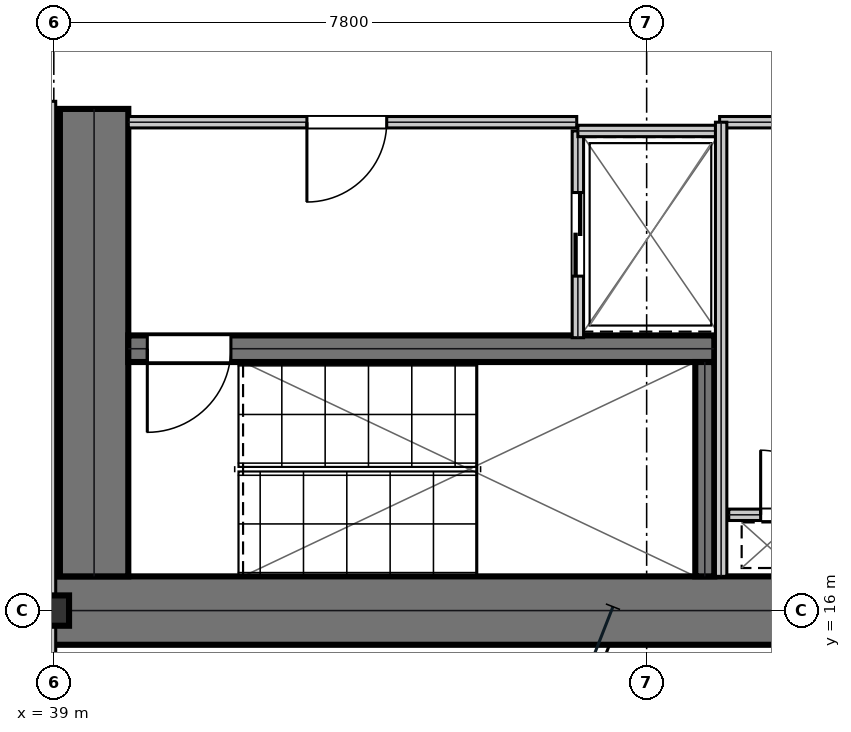
"""IFC4 building model, lengths in metres.
Left out: names, types, materials, properties, quantities, classifications, styles, units other than length and angle.
Written with IfcOpenShell. Run it as: python <this file> out.ifc"""

import sys

from ifc_helpers import new_model, si_unit, direction, frame, frame_2d, origin, origin_2d, place, context, subcontext, project, spatial, rectangle, i_section, extrude, element, fill, save


model = new_model("IFC4")
c1 = context("Model", 3, precision=1e-05, world=origin(), true_north=direction((0.0, 1.0)))
c2 = subcontext(c1, "Body", "Model", "MODEL_VIEW")
j1 = project(units=[si_unit("LENGTHUNIT", "METRE"), si_unit("PLANEANGLEUNIT", "RADIAN")], contexts=[c1])
p1 = place(None, origin())
s1 = spatial("IfcSite", under=j1, at=p1, CompositionType="ELEMENT")
p2 = place(p1, origin())
s2 = spatial("IfcBuilding", under=s1, at=p2, CompositionType="ELEMENT")
p3 = place(p2, frame((0.0, 0.0, 58.05)))
s3 = spatial("IfcBuildingStorey", under=s2, at=p3, CompositionType="ELEMENT", Elevation=58.05)
p4 = place(p3, frame((38.8, 16.0, 0.0), z_axis=(0.0, 0.0, 1.0), x_axis=(1.0, 0.0, 0.0)))
e1 = element("IfcWall", 1, at=p4, inside=s3, PredefinedType="SHEAR", context=c2, shape_type="SweptSolid", body=[
    extrude(rectangle(XDim=16.0, YDim=0.9, at=frame_2d((8.0, 0.0))), origin(), (0.0, 0.0, 1.0), 3.81),
])
p5 = place(p3, frame((39.53, 16.45, 0.0), z_axis=(0.0, 0.0, 1.0), x_axis=(0.0, 1.0, 0.0)))
e2 = element("IfcWall", 2, at=p5, inside=s3, PredefinedType="SHEAR", context=c2, shape_type="SweptSolid", body=[
    extrude(rectangle(XDim=6.15, YDim=0.9, at=frame_2d((3.075, 0.0))), origin(), (0.0, 0.0, 1.0), 3.81),
])
p6 = place(p3, frame((39.98, 19.445, 0.0), z_axis=(0.0, 0.0, 1.0), x_axis=(1.0, 0.0, 0.0)))
e3 = element("IfcWall", 3, at=p6, inside=s3, PredefinedType="SHEAR", context=c2, shape_type="SweptSolid", body=[
    extrude(rectangle(XDim=7.71, YDim=0.35, at=frame_2d((3.855, 0.0))), origin(), (0.0, 0.0, 1.0), 3.81),
])
p7 = place(p6, frame((0.25, 0.0, 0.0)))
e4 = element("IfcOpeningElement", 4, at=p7, cuts=e3, PredefinedType="OPENING", context=c2, shape_type="SweptSolid", body=[
    extrude(rectangle(XDim=1.1, YDim=2.15, at=frame_2d((0.55, 1.075))), frame((0.0, 0.185, 0.0), z_axis=(0.0, -1.0, 0.0), x_axis=(1.0, 0.0, 0.0)), (0.0, 0.0, 1.0), 0.37),
])
p8 = place(p3, frame((47.565, 16.45, 0.0), z_axis=(0.0, 0.0, 1.0), x_axis=(0.0, 1.0, 0.0)))
e5 = element("IfcWall", 5, at=p8, inside=s3, PredefinedType="SHEAR", context=c2, shape_type="SweptSolid", body=[
    extrude(rectangle(XDim=2.82, YDim=0.25, at=frame_2d((1.41, 0.0))), origin(), (0.0, 0.0, 1.0), 3.81),
])
p9 = place(p3, frame((39.0, 16.0, 0.0), z_axis=(0.0, 0.0, 1.0), x_axis=(1.0, 0.0, 0.0)))
e6 = element("IfcColumn", 6, at=p9, inside=s3, PredefinedType="COLUMN", context=c2, shape_type="SweptSolid", body=[
    extrude(i_section(OverallWidth=0.401, OverallDepth=0.399, WebThickness=0.025, FlangeThickness=0.04, at=origin_2d()), origin(), (0.0, 0.0, 1.0), 4.044),
])
p10 = place(p3, frame((39.98, 22.425, 0.0), z_axis=(0.0, 0.0, 1.0), x_axis=(1.0, 0.0, 0.0)))
e7 = element("IfcWall", 7, at=p10, inside=s3, PredefinedType="PARTITIONING", context=c2, shape_type="SweptSolid", body=[
    extrude(rectangle(XDim=5.9, YDim=0.15, at=frame_2d((2.95, 0.0))), origin(), (0.0, 0.0, 1.0), 3.81),
])
p11 = place(p10, frame((2.35, 0.0, 0.0)))
e8 = element("IfcOpeningElement", 8, at=p11, cuts=e7, PredefinedType="OPENING", context=c2, shape_type="SweptSolid", body=[
    extrude(rectangle(XDim=1.05, YDim=2.15, at=frame_2d((0.525, 1.075))), frame((0.0, 0.085, 0.0), z_axis=(0.0, -1.0, 0.0), x_axis=(1.0, 0.0, 0.0)), (0.0, 0.0, 1.0), 0.17),
])
p12 = place(p3, frame((45.895, 19.59, 0.0), z_axis=(0.0, 0.0, 1.0), x_axis=(0.0, 1.0, 0.0)))
e9 = element("IfcWall", 9, at=p12, inside=s3, PredefinedType="PARTITIONING", context=c2, shape_type="SweptSolid", body=[
    extrude(rectangle(XDim=2.72, YDim=0.15, at=frame_2d((1.36, 0.0))), origin(), (0.0, 0.0, 1.0), 3.81),
])
p13 = place(p12, frame((0.81, 0.0, 0.0)))
e10 = element("IfcOpeningElement", 10, at=p13, cuts=e9, PredefinedType="OPENING", context=c2, shape_type="SweptSolid", body=[
    extrude(rectangle(XDim=1.1, YDim=2.15, at=frame_2d((0.55, 1.075))), frame((0.0, 0.085, 0.0), z_axis=(0.0, -1.0, 0.0), x_axis=(1.0, 0.0, 0.0)), (0.0, 0.0, 1.0), 0.17),
])
p14 = place(p3, frame((45.895, 22.31, 0.0), z_axis=(0.0, 0.0, 1.0), x_axis=(1.0, 0.0, 0.0)))
e11 = element("IfcWall", 11, at=p14, inside=s3, PredefinedType="PARTITIONING", context=c2, shape_type="SweptSolid", body=[
    extrude(rectangle(XDim=1.915, YDim=0.15, at=frame_2d((0.958, 0.0))), origin(), (0.0, 0.0, 1.0), 3.81),
])
p15 = place(p3, frame((47.88, 17.26, 0.0), z_axis=(0.0, 0.0, 1.0), x_axis=(1.0, 0.0, 0.0)))
e12 = element("IfcWall", 12, at=p15, inside=s3, PredefinedType="PARTITIONING", context=c2, shape_type="SweptSolid", body=[
    extrude(rectangle(XDim=1.72, YDim=0.15, at=frame_2d((0.86, 0.0))), origin(), (0.0, 0.0, 1.0), 3.81),
])
p16 = place(p15, frame((0.42, 0.0, 0.0)))
e13 = element("IfcOpeningElement", 13, at=p16, cuts=e12, PredefinedType="OPENING", context=c2, shape_type="SweptSolid", body=[
    extrude(rectangle(XDim=0.85, YDim=2.15, at=frame_2d((0.425, 1.075))), frame((0.0, 0.085, 0.0), z_axis=(0.0, -1.0, 0.0), x_axis=(1.0, 0.0, 0.0)), (0.0, 0.0, 1.0), 0.17),
])
p17 = place(p3, frame((47.76, 22.425, 0.0), z_axis=(0.0, 0.0, 1.0), x_axis=(1.0, 0.0, 0.0)))
e14 = element("IfcWall", 14, at=p17, inside=s3, PredefinedType="PARTITIONING", context=c2, shape_type="SweptSolid", body=[
    extrude(rectangle(XDim=1.96, YDim=0.15, at=frame_2d((0.98, 0.0))), origin(), (0.0, 0.0, 1.0), 3.81),
])
p18 = place(p3, frame((47.78, 16.45, 0.0), z_axis=(0.0, 0.0, 1.0), x_axis=(0.0, 1.0, 0.0)))
e15 = element("IfcWall", 15, at=p18, inside=s3, PredefinedType="PARTITIONING", context=c2, shape_type="SweptSolid", body=[
    extrude(rectangle(XDim=5.975, YDim=0.15, at=frame_2d((2.988, 0.0))), origin(), (0.0, 0.0, 1.0), 3.81),
])
p19 = place(p3, frame((38.95, 14.5, 0.0), z_axis=(0.0, 0.0, 1.0), x_axis=(0.0, 1.0, 0.0)))
e16 = element("IfcWall", 16, at=p19, inside=s3, PredefinedType="PARTITIONING", context=c2, shape_type="SweptSolid", body=[
    extrude(rectangle(XDim=8.2, YDim=0.15, at=frame_2d((4.1, 0.0))), origin(), (0.0, 0.0, 1.0), 3.181),
])
p20 = place(p11, frame((1.05, 0.0, 0.0), z_axis=(0.0, 0.0, 1.0), x_axis=(-1.0, 0.0, 0.0)))
e17 = element("IfcDoor", 17, at=p20, inside=s3, OperationType="SINGLE_SWING_RIGHT", PredefinedType="DOOR", context=c2, shape_type="SweptSolid", body=[
    extrude(rectangle(XDim=1.05, YDim=2.15, at=frame_2d((0.525, 1.075))), frame((0.0, 0.025, 0.0), z_axis=(0.0, -1.0, 0.0), x_axis=(1.0, 0.0, 0.0)), (0.0, 0.0, 1.0), 0.05),
])
fill(e8, e17)
p21 = place(p13, frame((1.1, 0.0, 0.0), z_axis=(0.0, 0.0, 1.0), x_axis=(-1.0, 0.0, 0.0)))
e18 = element("IfcDoor", 18, at=p21, inside=s3, OperationType="DOUBLE_DOOR_SLIDING", PredefinedType="DOOR", context=c2, shape_type="SweptSolid", body=[
    extrude(rectangle(XDim=1.1, YDim=2.15, at=frame_2d((0.55, 1.075))), frame((0.0, 0.025, 0.0), z_axis=(0.0, -1.0, 0.0), x_axis=(1.0, 0.0, 0.0)), (0.0, 0.0, 1.0), 0.05),
])
fill(e10, e18)
p22 = place(p16, origin())
e19 = element("IfcDoor", 19, at=p22, inside=s3, OperationType="SINGLE_SWING_LEFT", PredefinedType="TRAPDOOR", context=c2, shape_type="SweptSolid", body=[
    extrude(rectangle(XDim=0.85, YDim=2.15, at=frame_2d((0.425, 1.075))), frame((0.0, 0.025, 0.0), z_axis=(0.0, -1.0, 0.0), x_axis=(1.0, 0.0, 0.0)), (0.0, 0.0, 1.0), 0.05),
])
fill(e13, e19)
p23 = place(p7, frame((1.1, 0.0, 0.0), z_axis=(0.0, 0.0, 1.0), x_axis=(-1.0, 0.0, 0.0)))
e20 = element("IfcDoor", 20, at=p23, inside=s3, OperationType="SINGLE_SWING_RIGHT", PredefinedType="DOOR", context=c2, shape_type="SweptSolid", body=[
    extrude(rectangle(XDim=1.1, YDim=2.15, at=frame_2d((0.55, 1.075))), frame((0.0, 0.025, 0.0), z_axis=(0.0, -1.0, 0.0), x_axis=(1.0, 0.0, 0.0)), (0.0, 0.0, 1.0), 0.05),
])
fill(e4, e20)
save(model, sys.argv[1])
